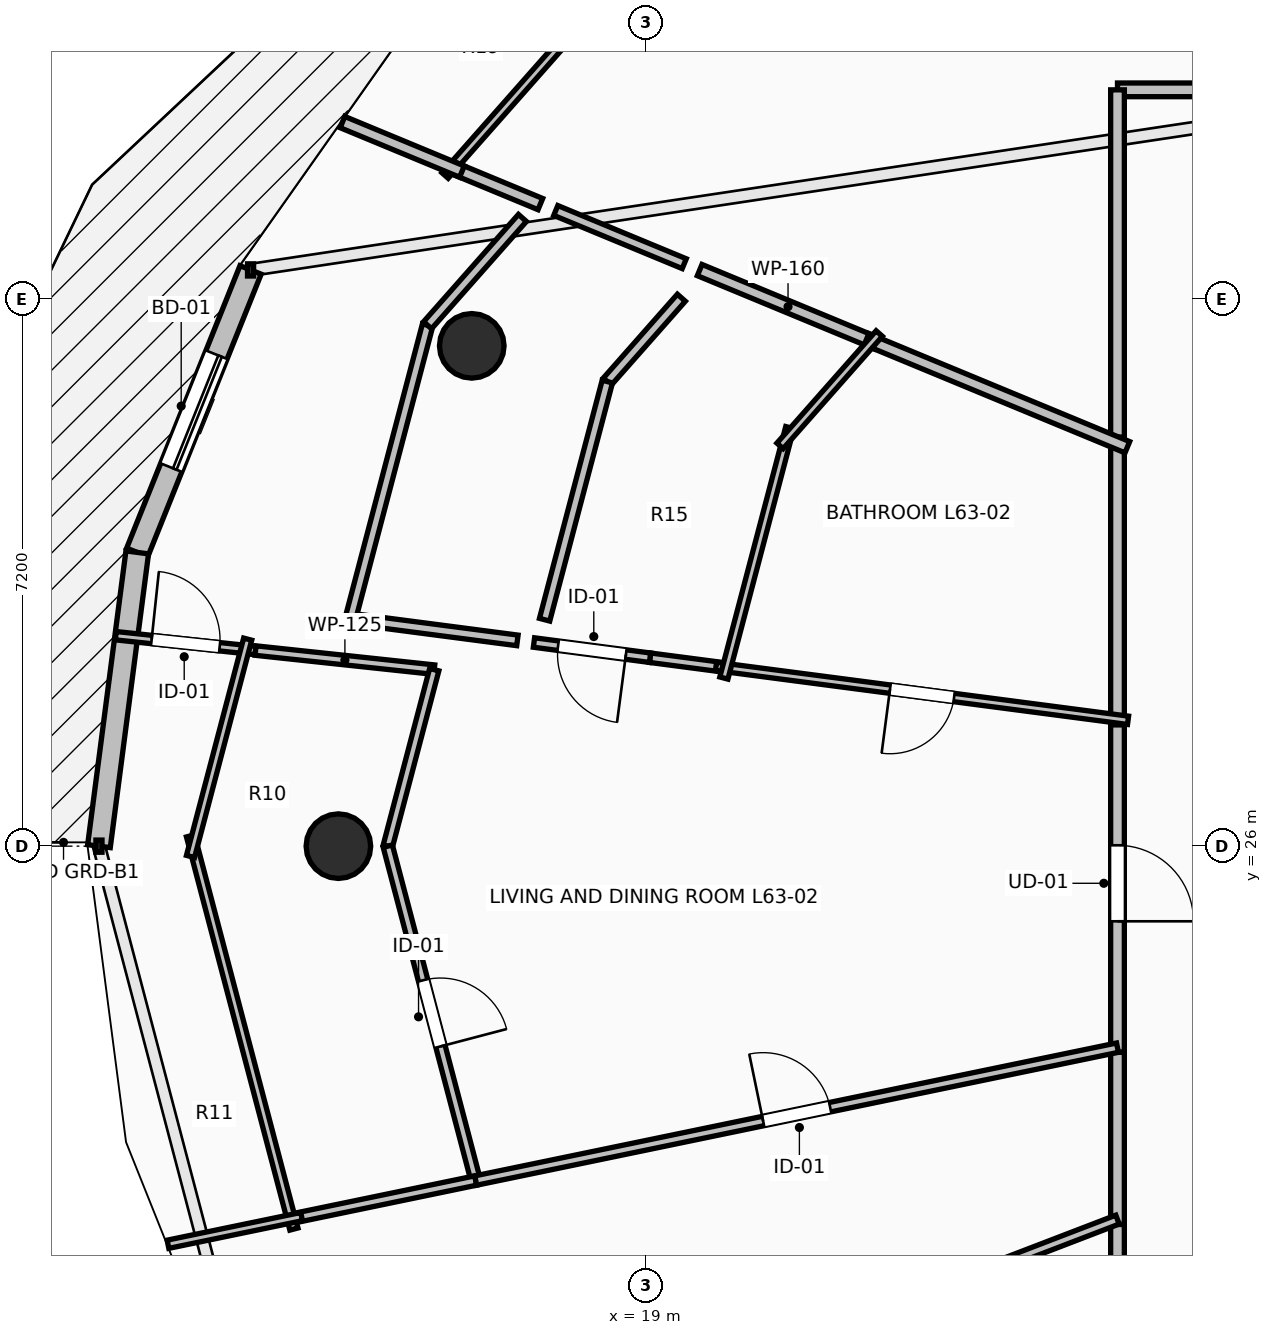
"""IFC4 building model, lengths in metres.
Left out: names, types, materials, properties, quantities, classifications, styles, units other than length and angle.
Written with IfcOpenShell. Run it as: python <this file> out.ifc"""

import sys

from ifc_helpers import new_model, si_unit, direction, frame, frame_2d, origin, origin_2d, place, context, subcontext, project, spatial, rectangle, circle, extrude, element, fill, save


model = new_model("IFC4")
c1 = context("Model", 3, precision=1e-05, world=origin(), true_north=direction((0.0, 1.0)))
c2 = subcontext(c1, "Body", "Model", "MODEL_VIEW")
j1 = project(units=[si_unit("LENGTHUNIT", "METRE"), si_unit("PLANEANGLEUNIT", "RADIAN")], contexts=[c1])
p1 = place(None, origin())
s1 = spatial("IfcSite", under=j1, at=p1, CompositionType="ELEMENT")
p2 = place(p1, origin())
s2 = spatial("IfcBuilding", under=s1, at=p2, CompositionType="ELEMENT")
p3 = place(p2, frame((0.0, 0.0, 234.25)))
s3 = spatial("IfcBuildingStorey", under=s2, at=p3, CompositionType="ELEMENT", Elevation=234.25)
for number, where, z_axis, x_axis in (
    (1, (16.705, 32.582, 0.0), (0.0, 0.0, 1.0), (-0.924, 0.383, 0.0)),
    (2, (14.95, 26.0, 0.0), (0.0, 0.0, 1.0), (-1.0, 0.0, 0.0)),
):
    element("IfcColumn", number, at=place(p3, frame(where, z_axis=z_axis, x_axis=x_axis)), inside=s3, PredefinedType="COLUMN", context=c2, shape_type="SweptSolid", body=[
        extrude(circle(Radius=0.425, at=origin_2d()), origin(), (0.0, 0.0, 1.0), 3.55),
    ])
p4 = place(p3, frame((13.794, 33.581, 0.0), z_axis=(0.0, 0.0, 1.0), x_axis=(-0.37234708598, -0.928093555393, 0.0)))
e3 = element("IfcWall", 3, at=p4, inside=s3, PredefinedType="STANDARD", context=c2, shape_type="SweptSolid", body=[
    extrude(rectangle(XDim=4.004, YDim=0.3, at=frame_2d((2.002, 0.0))), origin(), (0.0, 0.0, 1.0), 3.29),
])
p5 = place(p4, frame((1.202, 0.0, 0.0)))
e4 = element("IfcOpeningElement", 4, at=p5, cuts=e3, PredefinedType="OPENING", context=c2, shape_type="SweptSolid", body=[
    extrude(rectangle(XDim=1.6, YDim=2.3, at=frame_2d((0.8, 1.15))), frame((0.0, 0.165, 0.0), z_axis=(0.0, -1.0, 0.0), x_axis=(1.0, 0.0, 0.0)), (0.0, 0.0, 1.0), 0.33),
])
p6 = place(p3, frame((12.303, 29.865, 0.0), z_axis=(0.0, 0.0, 1.0), x_axis=(-0.129167789917, -0.991622751881, 0.0)))
e5 = element("IfcWall", 5, at=p6, inside=s3, PredefinedType="STANDARD", context=c2, shape_type="SweptSolid", body=[
    extrude(rectangle(XDim=3.897, YDim=0.3, at=frame_2d((1.949, 0.0))), origin(), (0.0, 0.0, 1.0), 3.29),
])
p7 = place(p3, frame((34.999, 35.95, 0.0), z_axis=(0.0, 0.0, 1.0), x_axis=(-1.0, 0.0, 0.0)))
e6 = element("IfcWall", 6, at=p7, inside=s3, PredefinedType="PARTITIONING", context=c2, shape_type="SweptSolid", body=[
    extrude(rectangle(XDim=9.799, YDim=0.18, at=frame_2d((4.899, 0.0))), origin(), (0.0, 0.0, 1.0), 2.482),
])
p8 = place(p7, frame((4.399, 0.0, 0.0)))
e7 = element("IfcOpeningElement", 7, at=p8, cuts=e6, PredefinedType="OPENING", context=c2, shape_type="SweptSolid", body=[
    extrude(rectangle(XDim=1.0, YDim=2.15, at=frame_2d((0.5, 1.075))), frame((0.0, 0.105, 0.0), z_axis=(0.0, -1.0, 0.0), x_axis=(1.0, 0.0, 0.0)), (0.0, 0.0, 1.0), 0.21),
])
p9 = place(p3, frame((25.2, 35.95, 0.0), z_axis=(0.0, 0.0, 1.0), x_axis=(0.0, -1.0, 0.0)))
e8 = element("IfcWall", 8, at=p9, inside=s3, PredefinedType="PARTITIONING", context=c2, shape_type="SweptSolid", body=[
    extrude(rectangle(XDim=4.708, YDim=0.18, at=frame_2d((2.354, 0.0))), origin(), (0.0, 0.0, 1.0), 2.482),
])
p10 = place(p3, frame((25.2, 27.735, 0.0), z_axis=(0.0, 0.0, 1.0), x_axis=(0.0, -1.0, 0.0)))
e9 = element("IfcWall", 9, at=p10, inside=s3, PredefinedType="PARTITIONING", context=c2, shape_type="SweptSolid", body=[
    extrude(rectangle(XDim=4.447, YDim=0.18, at=frame_2d((2.224, 0.0))), origin(), (0.0, 0.0, 1.0), 2.482),
])
p11 = place(p10, frame((1.723, 0.0, 0.0)))
e10 = element("IfcOpeningElement", 10, at=p11, cuts=e9, PredefinedType="OPENING", context=c2, shape_type="SweptSolid", body=[
    extrude(rectangle(XDim=1.0, YDim=2.15, at=frame_2d((0.5, 1.075))), frame((0.0, 0.105, 0.0), z_axis=(0.0, -1.0, 0.0), x_axis=(1.0, 0.0, 0.0)), (0.0, 0.0, 1.0), 0.21),
])
p12 = place(p3, frame((25.2, 31.382, 0.0), z_axis=(0.0, 0.0, 1.0), x_axis=(0.0, -1.0, 0.0)))
e11 = element("IfcWall", 11, at=p12, inside=s3, PredefinedType="PARTITIONING", context=c2, shape_type="SweptSolid", body=[
    extrude(rectangle(XDim=3.787, YDim=0.18, at=frame_2d((1.894, 0.0))), origin(), (0.0, 0.0, 1.0), 2.482),
])
p13 = place(p3, frame((25.2, 23.288, 0.0), z_axis=(0.0, 0.0, 1.0), x_axis=(0.0, -1.0, 0.0)))
e12 = element("IfcWall", 12, at=p13, inside=s3, PredefinedType="PARTITIONING", context=c2, shape_type="SweptSolid", body=[
    extrude(rectangle(XDim=2.265, YDim=0.18, at=frame_2d((1.133, 0.0))), origin(), (0.0, 0.0, 1.0), 3.29),
])
p14 = place(p3, frame((25.2, 21.023, 0.0), z_axis=(0.0, 0.0, 1.0), x_axis=(0.0, -1.0, 0.0)))
e13 = element("IfcWall", 13, at=p14, inside=s3, PredefinedType="PARTITIONING", context=c2, shape_type="SweptSolid", body=[
    extrude(rectangle(XDim=2.572, YDim=0.18, at=frame_2d((1.286, 0.0))), origin(), (0.0, 0.0, 1.0), 3.29),
])
p15 = place(p14, frame((0.861, 0.0, 0.0)))
e14 = element("IfcOpeningElement", 14, at=p15, cuts=e13, PredefinedType="OPENING", context=c2, shape_type="SweptSolid", body=[
    extrude(rectangle(XDim=0.85, YDim=2.1, at=frame_2d((0.425, 1.05))), frame((0.0, 0.105, 0.0), z_axis=(0.0, -1.0, 0.0), x_axis=(1.0, 0.0, 0.0)), (0.0, 0.0, 1.0), 0.21),
])
p16 = place(p3, frame((20.444, 39.452, 0.0), z_axis=(0.0, 0.0, 1.0), x_axis=(-0.662167862663, -0.749355537549, 0.0)))
e15 = element("IfcWall", 15, at=p16, inside=s3, PredefinedType="PARTITIONING", context=c2, shape_type="SweptSolid", body=[
    extrude(rectangle(XDim=6.177, YDim=0.11, at=frame_2d((3.089, 0.0))), origin(), (0.0, 0.0, 1.0), 3.29),
])
p17 = place(p3, frame((16.446, 34.928, 0.0), z_axis=(0.0, 0.0, 1.0), x_axis=(0.923851056351, -0.382752172663, 0.0)))
e16 = element("IfcWall", 16, at=p17, inside=s3, PredefinedType="PARTITIONING", context=c2, shape_type="SweptSolid", body=[
    extrude(rectangle(XDim=1.257, YDim=0.16, at=frame_2d((0.628, 0.0))), origin(), (0.0, 0.0, 1.0), 3.29),
])
p18 = place(p3, frame((19.703, 33.579, 0.0), z_axis=(0.0, 0.0, 1.0), x_axis=(0.923878502515, -0.382685918986, 0.0)))
e17 = element("IfcWall", 17, at=p18, inside=s3, PredefinedType="PARTITIONING", context=c2, shape_type="SweptSolid", body=[
    extrude(rectangle(XDim=2.517, YDim=0.16, at=frame_2d((1.258, 0.0))), origin(), (0.0, 0.0, 1.0), 2.924),
])
p19 = place(p3, frame((21.899, 32.669, 0.0), z_axis=(0.0, 0.0, 1.0), x_axis=(0.9238685833, -0.382709865029, 0.0)))
e18 = element("IfcWall", 18, at=p19, inside=s3, PredefinedType="PARTITIONING", context=c2, shape_type="SweptSolid", body=[
    extrude(rectangle(XDim=3.713, YDim=0.16, at=frame_2d((1.857, 0.0))), origin(), (0.0, 0.0, 1.0), 2.972),
])
p20 = place(p3, frame((15.004, 35.526, 0.0), z_axis=(0.0, 0.0, 1.0), x_axis=(0.923843638485, -0.382770076719, 0.0)))
e19 = element("IfcWall", 19, at=p20, inside=s3, PredefinedType="PARTITIONING", context=c2, shape_type="SweptSolid", body=[
    extrude(rectangle(XDim=1.701, YDim=0.16, at=frame_2d((0.851, 0.0))), origin(), (0.0, 0.0, 1.0), 3.29),
])
p21 = place(p3, frame((20.057, 28.347, 0.0), z_axis=(0.0, 0.0, 1.0), x_axis=(-0.99150495655, 0.130068909188, 0.0)))
e20 = element("IfcWall", 20, at=p21, inside=s3, PredefinedType="PARTITIONING", context=c2, shape_type="SweptSolid", body=[
    extrude(rectangle(XDim=1.015, YDim=0.125, at=frame_2d((0.508, 0.0))), origin(), (0.0, 0.0, 1.0), 2.924),
])
p22 = place(p3, frame((19.05, 28.479, 0.0), z_axis=(0.0, 0.0, 1.0), x_axis=(-0.991536647804, 0.129827100648, 0.0)))
e21 = element("IfcWall", 21, at=p22, inside=s3, PredefinedType="PARTITIONING", context=c2, shape_type="SweptSolid", body=[
    extrude(rectangle(XDim=1.54, YDim=0.125, at=frame_2d((0.77, 0.0))), origin(), (0.0, 0.0, 1.0), 3.29),
])
p23 = place(p22, frame((0.32, 0.0, 0.0)))
e22 = element("IfcOpeningElement", 22, at=p23, cuts=e21, PredefinedType="OPENING", context=c2, shape_type="SweptSolid", body=[
    extrude(rectangle(XDim=0.9, YDim=2.1, at=frame_2d((0.45, 1.05))), frame((0.0, 0.077, 0.0), z_axis=(0.0, -1.0, 0.0), x_axis=(1.0, 0.0, 0.0)), (0.0, 0.0, 1.0), 0.155),
])
p24 = place(p3, frame((25.339, 27.656, 0.0), z_axis=(0.0, 0.0, 1.0), x_axis=(-0.991543288598, 0.129776372412, 0.0)))
e23 = element("IfcWall", 23, at=p24, inside=s3, PredefinedType="PARTITIONING", context=c2, shape_type="SweptSolid", body=[
    extrude(rectangle(XDim=5.467, YDim=0.11, at=frame_2d((2.733, 0.0))), origin(), (0.0, 0.0, 1.0), 2.482),
])
p25 = place(p24, frame((2.308, 0.0, 0.0)))
e24 = element("IfcOpeningElement", 24, at=p25, cuts=e23, PredefinedType="OPENING", context=c2, shape_type="SweptSolid", body=[
    extrude(rectangle(XDim=0.85, YDim=2.1, at=frame_2d((0.425, 1.05))), frame((0.0, 0.07, 0.0), z_axis=(0.0, -1.0, 0.0), x_axis=(1.0, 0.0, 0.0)), (0.0, 0.0, 1.0), 0.14),
])
p26 = place(p3, frame((12.021, 28.769, 0.0), z_axis=(0.0, 0.0, 1.0), x_axis=(0.994395705484, -0.105722187429, 0.0)))
e25 = element("IfcWall", 25, at=p26, inside=s3, PredefinedType="PARTITIONING", context=c2, shape_type="SweptSolid", body=[
    extrude(rectangle(XDim=1.85, YDim=0.11, at=frame_2d((0.925, 0.0))), origin(), (0.0, 0.0, 1.0), 3.29),
])
p27 = place(p26, frame((0.475, 0.0, 0.0)))
e26 = element("IfcOpeningElement", 26, at=p27, cuts=e25, PredefinedType="OPENING", context=c2, shape_type="SweptSolid", body=[
    extrude(rectangle(XDim=0.9, YDim=2.1, at=frame_2d((0.45, 1.05))), frame((0.0, 0.07, 0.0), z_axis=(0.0, -1.0, 0.0), x_axis=(1.0, 0.0, 0.0)), (0.0, 0.0, 1.0), 0.14),
])
p28 = place(p3, frame((13.86, 28.573, 0.0), z_axis=(0.0, 0.0, 1.0), x_axis=(0.994349321614, -0.106157555574, 0.0)))
e27 = element("IfcWall", 27, at=p28, inside=s3, PredefinedType="PARTITIONING", context=c2, shape_type="SweptSolid", body=[
    extrude(rectangle(XDim=2.364, YDim=0.125, at=frame_2d((1.182, 0.0))), origin(), (0.0, 0.0, 1.0), 2.874),
])
p29 = place(p3, frame((16.211, 28.322, 0.0), z_axis=(0.0, 0.0, 1.0), x_axis=(-0.254408212112, -0.96709692462, 0.0)))
e28 = element("IfcWall", 28, at=p29, inside=s3, PredefinedType="PARTITIONING", context=c2, shape_type="SweptSolid", body=[
    extrude(rectangle(XDim=2.401, YDim=0.125, at=frame_2d((1.201, 0.0))), origin(), (0.0, 0.0, 1.0), 2.482),
])
p30 = place(p3, frame((15.6, 26.0, 0.0), z_axis=(0.0, 0.0, 1.0), x_axis=(0.25436383836, -0.967108596661, 0.0)))
e29 = element("IfcWall", 29, at=p30, inside=s3, PredefinedType="PARTITIONING", context=c2, shape_type="SweptSolid", body=[
    extrude(rectangle(XDim=4.549, YDim=0.125, at=frame_2d((2.274, 0.0))), origin(), (0.0, 0.0, 1.0), 2.482),
])
p31 = place(p30, frame((1.824, 0.0, 0.0)))
e30 = element("IfcOpeningElement", 30, at=p31, cuts=e29, PredefinedType="OPENING", context=c2, shape_type="SweptSolid", body=[
    extrude(rectangle(XDim=0.9, YDim=2.1, at=frame_2d((0.45, 1.05))), frame((0.0, 0.077, 0.0), z_axis=(0.0, -1.0, 0.0), x_axis=(1.0, 0.0, 0.0)), (0.0, 0.0, 1.0), 0.155),
])
p32 = place(p3, frame((16.757, 21.601, 0.0), z_axis=(0.0, 0.0, 1.0), x_axis=(-0.979193678003, -0.2029279206, 0.0)))
e31 = element("IfcWall", 31, at=p32, inside=s3, PredefinedType="PARTITIONING", context=c2, shape_type="SweptSolid", body=[
    extrude(rectangle(XDim=2.479, YDim=0.125, at=frame_2d((1.24, 0.0))), origin(), (0.0, 0.0, 1.0), 2.874),
])
p33 = place(p3, frame((16.757, 21.601, 0.0), z_axis=(0.0, 0.0, 1.0), x_axis=(0.979226116247, 0.20277133244, 0.0)))
e32 = element("IfcWall", 32, at=p33, inside=s3, PredefinedType="PARTITIONING", context=c2, shape_type="SweptSolid", body=[
    extrude(rectangle(XDim=8.622, YDim=0.125, at=frame_2d((4.311, 0.0))), origin(), (0.0, 0.0, 1.0), 2.924),
])
p34 = place(p33, frame((3.861, 0.0, 0.0)))
e33 = element("IfcOpeningElement", 33, at=p34, cuts=e32, PredefinedType="OPENING", context=c2, shape_type="SweptSolid", body=[
    extrude(rectangle(XDim=0.9, YDim=2.1, at=frame_2d((0.45, 1.05))), frame((0.0, 0.077, 0.0), z_axis=(0.0, -1.0, 0.0), x_axis=(1.0, 0.0, 0.0)), (0.0, 0.0, 1.0), 0.155),
])
p35 = place(p3, frame((20.021, 28.212, 0.0), z_axis=(0.0, 0.0, 1.0), x_axis=(0.254539154478, 0.967062468943, 0.0)))
e34 = element("IfcWall", 34, at=p35, inside=s3, PredefinedType="PARTITIONING", context=c2, shape_type="SweptSolid", body=[
    extrude(rectangle(XDim=3.407, YDim=0.11, at=frame_2d((1.704, 0.0))), origin(), (0.0, 0.0, 1.0), 2.482),
])
p36 = place(p3, frame((20.76, 31.266, 0.0), z_axis=(0.0, 0.0, 1.0), x_axis=(0.662047420969, 0.749461948593, 0.0)))
e35 = element("IfcWall", 35, at=p36, inside=s3, PredefinedType="PARTITIONING", context=c2, shape_type="SweptSolid", body=[
    extrude(rectangle(XDim=1.972, YDim=0.11, at=frame_2d((0.986, 0.0))), origin(), (0.0, 0.0, 1.0), 3.29),
])
p37 = place(p3, frame((14.365, 20.963, 0.0), z_axis=(0.0, 0.0, 1.0), x_axis=(-0.254288836667, 0.967128320104, 0.0)))
e36 = element("IfcWall", 36, at=p37, inside=s3, PredefinedType="PARTITIONING", context=c2, shape_type="SweptSolid", body=[
    extrude(rectangle(XDim=5.349, YDim=0.11, at=frame_2d((2.674, 0.0))), origin(), (0.0, 0.0, 1.0), 3.29),
])
p38 = place(p3, frame((13.004, 25.865, 0.0), z_axis=(0.0, 0.0, 1.0), x_axis=(0.254448582557, 0.967086303716, 0.0)))
e37 = element("IfcWall", 37, at=p38, inside=s3, PredefinedType="PARTITIONING", context=c2, shape_type="SweptSolid", body=[
    extrude(rectangle(XDim=2.956, YDim=0.11, at=frame_2d((1.478, 0.0))), origin(), (0.0, 0.0, 1.0), 3.29),
])
p39 = place(p3, frame((12.708, 20.763, 0.0), z_axis=(0.0, 0.0, 1.0), x_axis=(0.979256697864, 0.202623591143, 0.0)))
e38 = element("IfcWall", 38, at=p39, inside=s3, PredefinedType="PARTITIONING", context=c2, shape_type="SweptSolid", body=[
    extrude(rectangle(XDim=1.795, YDim=0.11, at=frame_2d((0.898, 0.0))), origin(), (0.0, 0.0, 1.0), 3.29),
])
p40 = place(p3, frame((14.748, 17.074, 0.0), z_axis=(0.0, 0.0, 1.0), x_axis=(0.93355564233, 0.358432507836, 0.0)))
e39 = element("IfcWall", 39, at=p40, inside=s3, PredefinedType="PARTITIONING", context=c2, shape_type="SweptSolid", body=[
    extrude(rectangle(XDim=11.196, YDim=0.125, at=frame_2d((5.598, 0.0))), origin(), (0.0, 0.0, 1.0), 2.482),
])
p41 = place(p3, frame((17.81, 34.363, 0.0), z_axis=(0.0, 0.0, 1.0), x_axis=(0.923888322618, -0.382662210481, 0.0)))
e40 = element("IfcWall", 40, at=p41, inside=s3, PredefinedType="PARTITIONING", context=c2, shape_type="SweptSolid", body=[
    extrude(rectangle(XDim=1.829, YDim=0.14, at=frame_2d((0.915, 0.0))), origin(), (0.0, 0.0, 1.0), 2.874),
])
p42 = place(p3, frame((17.305, 28.707, 0.0), z_axis=(0.0, 0.0, 1.0), x_axis=(-0.991583198316, 0.129471081011, 0.0)))
e41 = element("IfcWall", 41, at=p42, inside=s3, PredefinedType="PARTITIONING", context=c2, shape_type="SweptSolid", body=[
    extrude(rectangle(XDim=2.216, YDim=0.14, at=frame_2d((1.108, 0.0))), origin(), (0.0, 0.0, 1.0), 2.874),
])
p43 = place(p3, frame((15.108, 28.994, 0.0), z_axis=(0.0, 0.0, 1.0), x_axis=(0.254393917139, 0.967100684997, 0.0)))
e42 = element("IfcWall", 42, at=p43, inside=s3, PredefinedType="PARTITIONING", context=c2, shape_type="SweptSolid", body=[
    extrude(rectangle(XDim=3.99, YDim=0.14, at=frame_2d((1.995, 0.0))), origin(), (0.0, 0.0, 1.0), 3.29),
])
p44 = place(p3, frame((16.123, 32.853, 0.0), z_axis=(0.0, 0.0, 1.0), x_axis=(0.662302679983, 0.749236384652, 0.0)))
e43 = element("IfcWall", 43, at=p44, inside=s3, PredefinedType="PARTITIONING", context=c2, shape_type="SweptSolid", body=[
    extrude(rectangle(XDim=1.885, YDim=0.14, at=frame_2d((0.942, 0.0))), origin(), (0.0, 0.0, 1.0), 3.29),
])
p45 = place(p3, frame((19.462, 33.215, 0.0), z_axis=(0.0, 0.0, 1.0), x_axis=(-0.661857573224, -0.749629610385, 0.0)))
e44 = element("IfcWall", 44, at=p45, inside=s3, PredefinedType="PARTITIONING", context=c2, shape_type="SweptSolid", body=[
    extrude(rectangle(XDim=1.471, YDim=0.14, at=frame_2d((0.736, 0.0))), origin(), (0.0, 0.0, 1.0), 2.482),
])
p46 = place(p3, frame((18.488, 32.112, 0.0), z_axis=(0.0, 0.0, 1.0), x_axis=(-0.254626828673, -0.967039388091, 0.0)))
e45 = element("IfcWall", 45, at=p46, inside=s3, PredefinedType="PARTITIONING", context=c2, shape_type="SweptSolid", body=[
    extrude(rectangle(XDim=3.24, YDim=0.14, at=frame_2d((1.62, 0.0))), origin(), (0.0, 0.0, 1.0), 2.482),
])
p47 = place(p5, origin())
e46 = element("IfcDoor", 46, at=p47, inside=s3, OperationType="SLIDING_TO_LEFT", PredefinedType="DOOR", context=c2, shape_type="SweptSolid", body=[
    extrude(rectangle(XDim=1.6, YDim=2.3, at=frame_2d((0.8, 1.15))), frame((0.0, 0.025, 0.0), z_axis=(0.0, -1.0, 0.0), x_axis=(1.0, 0.0, 0.0)), (0.0, 0.0, 1.0), 0.05),
])
fill(e4, e46)
p48 = place(p11, origin())
e47 = element("IfcDoor", 47, at=p48, inside=s3, OperationType="SINGLE_SWING_RIGHT", PredefinedType="DOOR", context=c2, shape_type="SweptSolid", body=[
    extrude(rectangle(XDim=1.0, YDim=2.15, at=frame_2d((0.5, 1.075))), frame((0.0, 0.025, 0.0), z_axis=(0.0, -1.0, 0.0), x_axis=(1.0, 0.0, 0.0)), (0.0, 0.0, 1.0), 0.05),
])
fill(e10, e47)
p49 = place(p23, origin())
e48 = element("IfcDoor", 48, at=p49, inside=s3, OperationType="SINGLE_SWING_LEFT", PredefinedType="DOOR", context=c2, shape_type="SweptSolid", body=[
    extrude(rectangle(XDim=0.9, YDim=2.1, at=frame_2d((0.45, 1.05))), frame((0.0, 0.025, 0.0), z_axis=(0.0, -1.0, 0.0), x_axis=(1.0, 0.0, 0.0)), (0.0, 0.0, 1.0), 0.05),
])
fill(e22, e48)
p50 = place(p25, origin())
e49 = element("IfcDoor", 49, at=p50, inside=s3, OperationType="SINGLE_SWING_RIGHT", PredefinedType="DOOR", context=c2, shape_type="SweptSolid", body=[
    extrude(rectangle(XDim=0.85, YDim=2.1, at=frame_2d((0.425, 1.05))), frame((0.0, 0.025, 0.0), z_axis=(0.0, -1.0, 0.0), x_axis=(1.0, 0.0, 0.0)), (0.0, 0.0, 1.0), 0.05),
])
fill(e24, e49)
p51 = place(p27, origin())
e50 = element("IfcDoor", 50, at=p51, inside=s3, OperationType="SINGLE_SWING_LEFT", PredefinedType="DOOR", context=c2, shape_type="SweptSolid", body=[
    extrude(rectangle(XDim=0.9, YDim=2.1, at=frame_2d((0.45, 1.05))), frame((0.0, 0.025, 0.0), z_axis=(0.0, -1.0, 0.0), x_axis=(1.0, 0.0, 0.0)), (0.0, 0.0, 1.0), 0.05),
])
fill(e26, e50)
p52 = place(p31, origin())
e51 = element("IfcDoor", 51, at=p52, inside=s3, OperationType="SINGLE_SWING_RIGHT", PredefinedType="DOOR", context=c2, shape_type="SweptSolid", body=[
    extrude(rectangle(XDim=0.9, YDim=2.1, at=frame_2d((0.45, 1.05))), frame((0.0, 0.025, 0.0), z_axis=(0.0, -1.0, 0.0), x_axis=(1.0, 0.0, 0.0)), (0.0, 0.0, 1.0), 0.05),
])
fill(e30, e51)
p53 = place(p34, origin())
e52 = element("IfcDoor", 52, at=p53, inside=s3, OperationType="SINGLE_SWING_LEFT", PredefinedType="DOOR", context=c2, shape_type="SweptSolid", body=[
    extrude(rectangle(XDim=0.9, YDim=2.1, at=frame_2d((0.45, 1.05))), frame((0.0, 0.025, 0.0), z_axis=(0.0, -1.0, 0.0), x_axis=(1.0, 0.0, 0.0)), (0.0, 0.0, 1.0), 0.05),
])
fill(e33, e52)
save(model, sys.argv[1])
